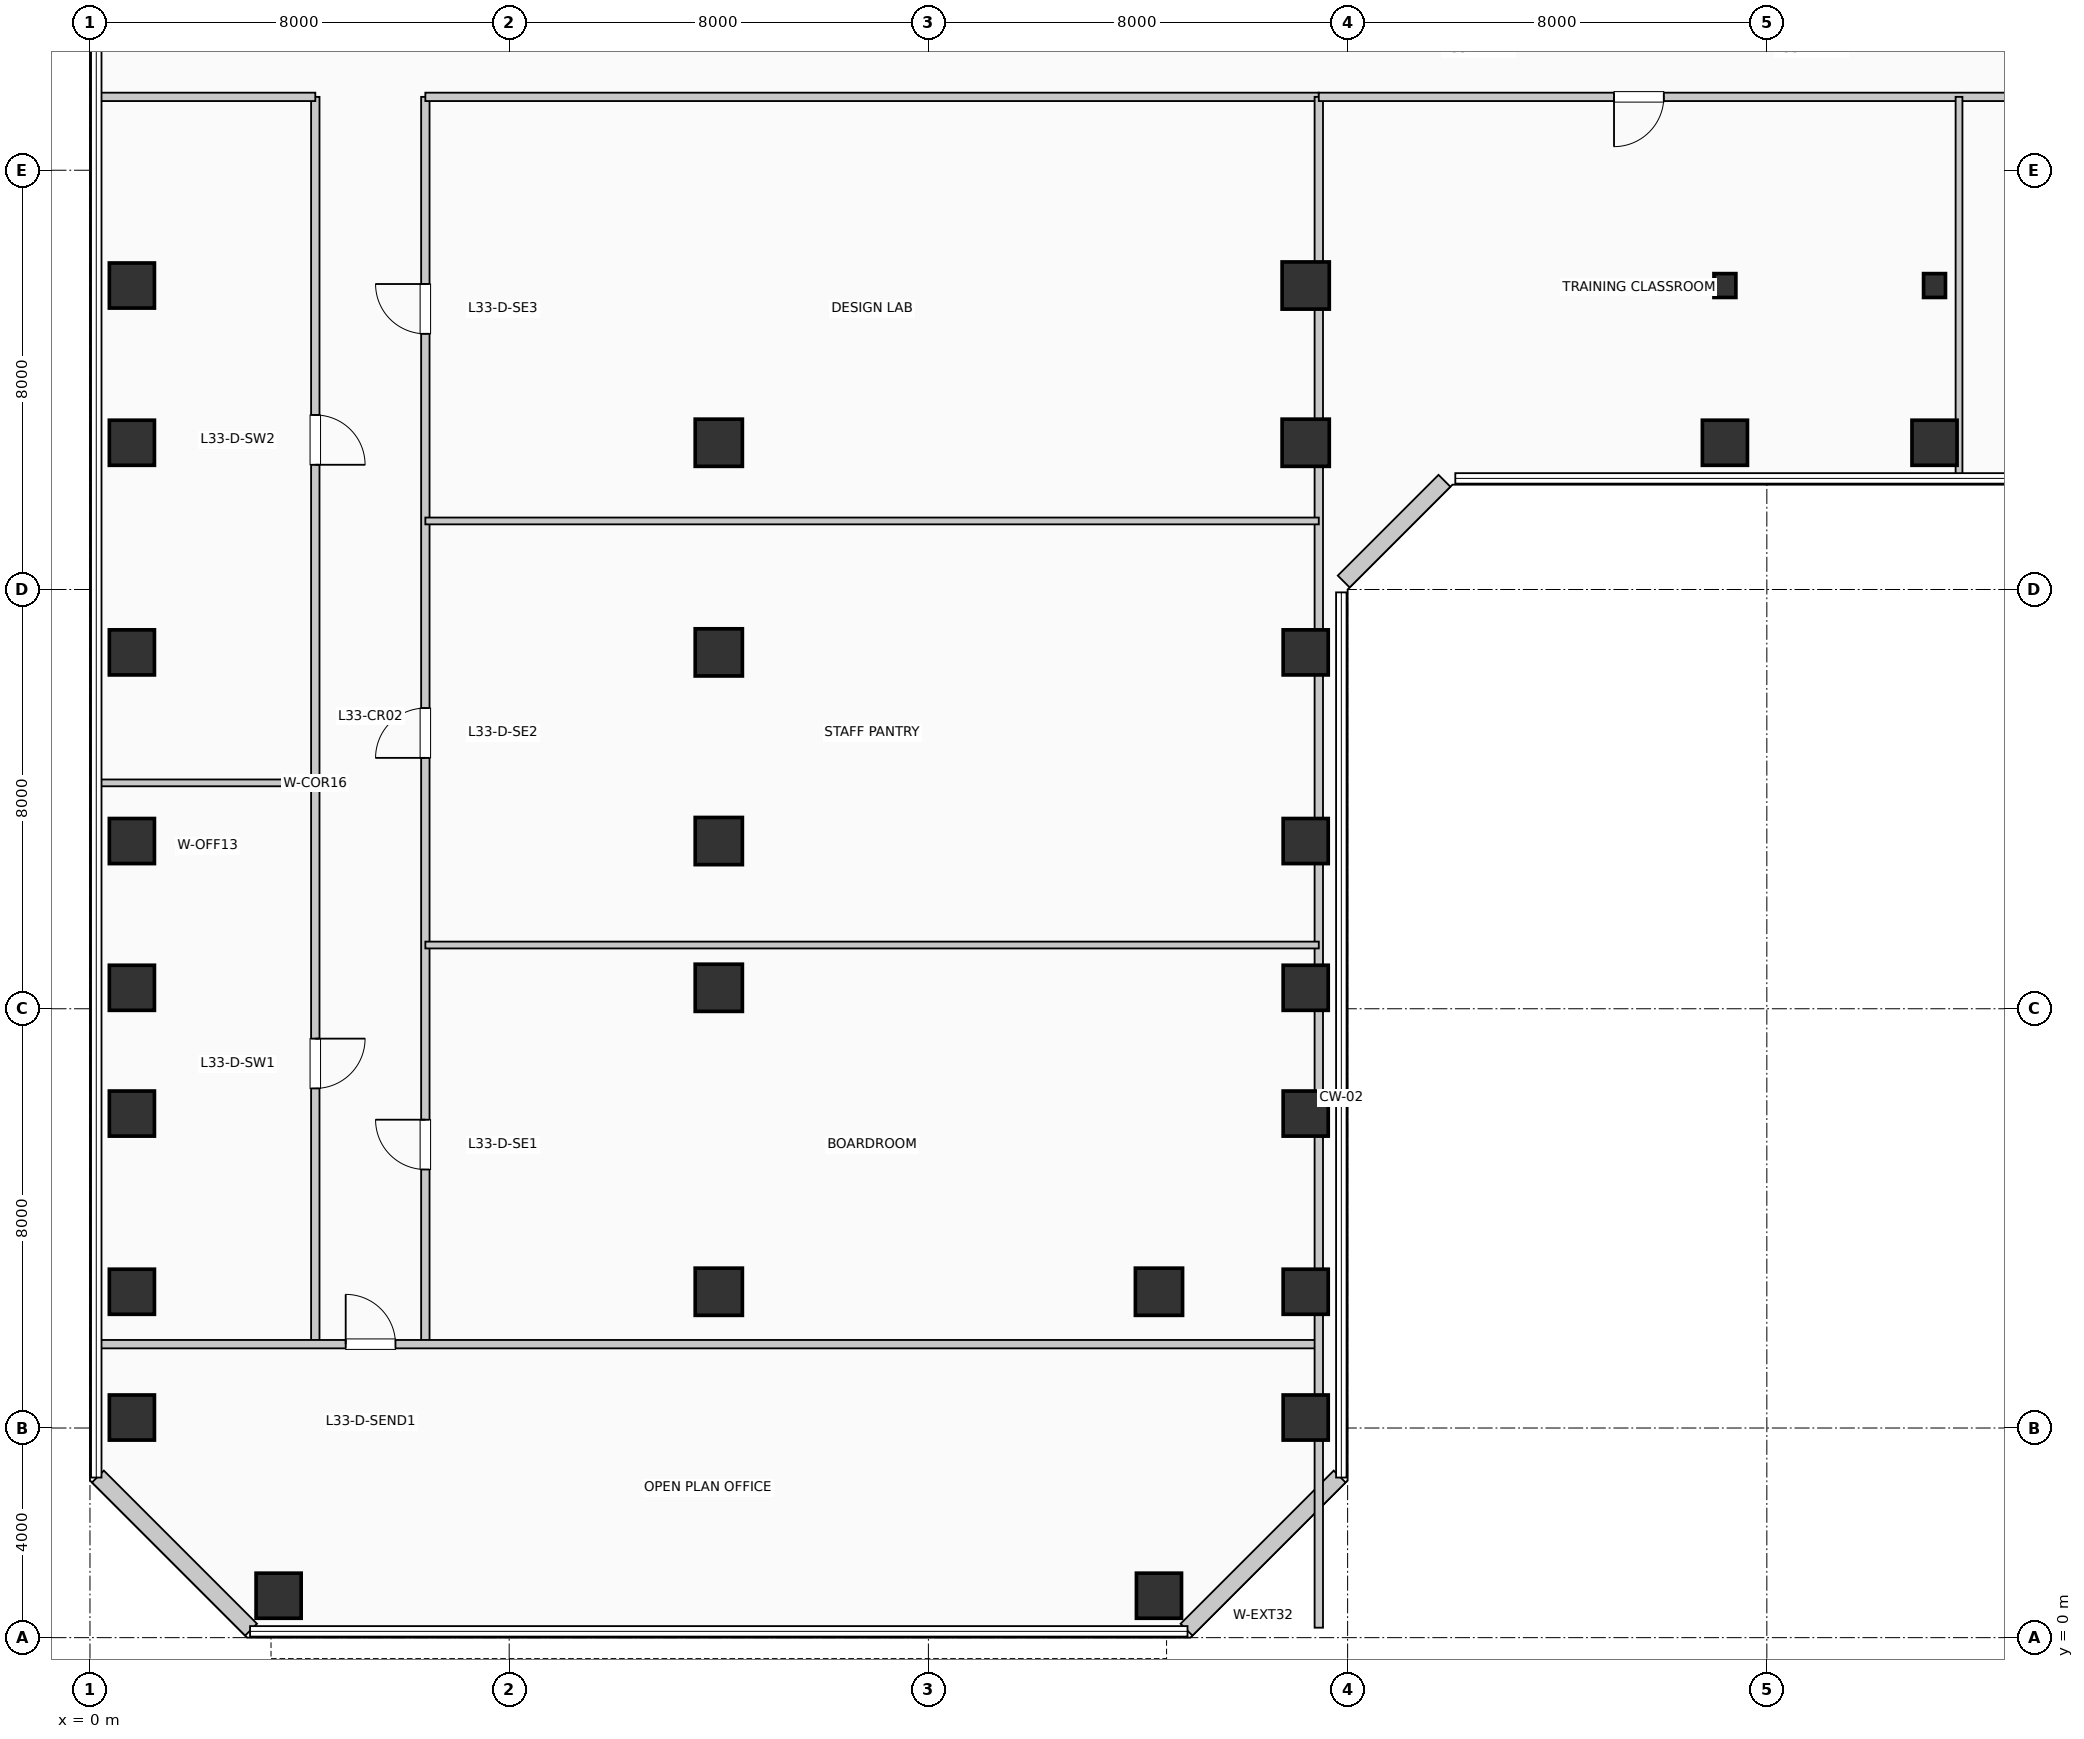
"""IFC4 building model, lengths in metres.
Left out: names, types, materials, properties, quantities, classifications, styles, units other than length and angle.
Written with IfcOpenShell. Run it as: python <this file> out.ifc"""

import sys

from ifc_helpers import new_model, si_unit, direction, frame, frame_2d, origin, origin_2d, place, context, subcontext, project, spatial, rectangle, i_section, extrude, element, fill, save


model = new_model("IFC4")
c1 = context("Model", 3, precision=1e-05, world=origin(), true_north=direction((0.0, 1.0)))
c2 = subcontext(c1, "Body", "Model", "MODEL_VIEW")
j1 = project(units=[si_unit("LENGTHUNIT", "METRE"), si_unit("PLANEANGLEUNIT", "RADIAN")], contexts=[c1])
p1 = place(None, origin())
s1 = spatial("IfcSite", under=j1, at=p1, CompositionType="ELEMENT")
p2 = place(p1, origin())
s2 = spatial("IfcBuilding", under=s1, at=p2, CompositionType="ELEMENT")
p3 = place(p2, frame((0.0, 0.0, 138.93)))
s3 = spatial("IfcBuildingStorey", under=s2, at=p3, CompositionType="ELEMENT", Elevation=138.93)
for number, where, z_axis, x_axis in (
    (1, (0.8, 4.2, 0.0), (0.0, 0.0, 1.0), (1.0, 0.0, 0.0)),
    (2, (0.8, 6.6, 0.0), (0.0, 0.0, 1.0), (1.0, 0.0, 0.0)),
    (3, (0.8, 10.0, 0.0), (0.0, 0.0, 1.0), (1.0, 0.0, 0.0)),
    (4, (0.8, 12.4, 0.0), (0.0, 0.0, 1.0), (1.0, 0.0, 0.0)),
    (5, (0.8, 15.2, 0.0), (0.0, 0.0, 1.0), (1.0, 0.0, 0.0)),
    (6, (0.8, 18.8, 0.0), (0.0, 0.0, 1.0), (1.0, 0.0, 0.0)),
    (7, (0.8, 22.8, 0.0), (0.0, 0.0, 1.0), (1.0, 0.0, 0.0)),
    (8, (0.8, 25.8, 0.0), (0.0, 0.0, 1.0), (1.0, 0.0, 0.0)),
    (9, (3.6, 0.8, 0.0), (0.0, 0.0, 1.0), (1.0, 0.0, 0.0)),
):
    element("IfcColumn", number, at=place(p3, frame(where, z_axis=z_axis, x_axis=x_axis)), inside=s3, PredefinedType="COLUMN", context=c2, shape_type="SweptSolid", body=[
        extrude(rectangle(XDim=0.86, YDim=0.86, at=origin_2d()), origin(), (0.0, 0.0, 1.0), 3.96),
    ])
for number, where, z_axis, x_axis in (
    (10, (12.0, 6.6, 0.0), (0.0, 0.0, 1.0), (1.0, 0.0, 0.0)),
    (11, (12.0, 12.4, 0.0), (0.0, 0.0, 1.0), (1.0, 0.0, 0.0)),
    (12, (12.0, 15.2, 0.0), (0.0, 0.0, 1.0), (1.0, 0.0, 0.0)),
    (13, (12.0, 18.8, 0.0), (0.0, 0.0, 1.0), (1.0, 0.0, 0.0)),
    (14, (12.0, 22.8, 0.0), (0.0, 0.0, 1.0), (1.0, 0.0, 0.0)),
):
    element("IfcColumn", number, at=place(p3, frame(where, z_axis=z_axis, x_axis=x_axis)), inside=s3, PredefinedType="COLUMN", context=c2, shape_type="SweptSolid", body=[
        extrude(rectangle(XDim=0.9, YDim=0.9, at=origin_2d()), origin(), (0.0, 0.0, 1.0), 3.96),
    ])
p4 = place(p3, frame((20.4, 0.8, 0.0), z_axis=(0.0, 0.0, 1.0), x_axis=(1.0, 0.0, 0.0)))
e15 = element("IfcColumn", 15, at=p4, inside=s3, PredefinedType="COLUMN", context=c2, shape_type="SweptSolid", body=[
    extrude(rectangle(XDim=0.86, YDim=0.86, at=origin_2d()), origin(), (0.0, 0.0, 1.0), 3.96),
])
p5 = place(p3, frame((20.4, 6.6, 0.0), z_axis=(0.0, 0.0, 1.0), x_axis=(1.0, 0.0, 0.0)))
e16 = element("IfcColumn", 16, at=p5, inside=s3, PredefinedType="COLUMN", context=c2, shape_type="SweptSolid", body=[
    extrude(rectangle(XDim=0.9, YDim=0.9, at=origin_2d()), origin(), (0.0, 0.0, 1.0), 3.96),
])
for number, where, z_axis, x_axis in (
    (17, (23.2, 4.2, 0.0), (0.0, 0.0, 1.0), (1.0, 0.0, 0.0)),
    (18, (23.2, 6.6, 0.0), (0.0, 0.0, 1.0), (1.0, 0.0, 0.0)),
    (19, (23.2, 10.0, 0.0), (0.0, 0.0, 1.0), (1.0, 0.0, 0.0)),
    (20, (23.2, 12.4, 0.0), (0.0, 0.0, 1.0), (1.0, 0.0, 0.0)),
    (21, (23.2, 15.2, 0.0), (0.0, 0.0, 1.0), (1.0, 0.0, 0.0)),
    (22, (23.2, 18.8, 0.0), (0.0, 0.0, 1.0), (1.0, 0.0, 0.0)),
):
    element("IfcColumn", number, at=place(p3, frame(where, z_axis=z_axis, x_axis=x_axis)), inside=s3, PredefinedType="COLUMN", context=c2, shape_type="SweptSolid", body=[
        extrude(rectangle(XDim=0.86, YDim=0.86, at=origin_2d()), origin(), (0.0, 0.0, 1.0), 3.96),
    ])
for number, where, z_axis, x_axis in (
    (23, (23.2, 22.8, 0.0), (0.0, 0.0, 1.0), (1.0, 0.0, 0.0)),
    (24, (23.2, 25.8, 0.0), (0.0, 0.0, 1.0), (1.0, 0.0, 0.0)),
):
    element("IfcColumn", number, at=place(p3, frame(where, z_axis=z_axis, x_axis=x_axis)), inside=s3, PredefinedType="COLUMN", context=c2, shape_type="SweptSolid", body=[
        extrude(rectangle(XDim=0.9, YDim=0.9, at=origin_2d()), origin(), (0.0, 0.0, 1.0), 3.96),
    ])
p6 = place(p3, frame((31.2, 22.8, 0.0), z_axis=(0.0, 0.0, 1.0), x_axis=(1.0, 0.0, 0.0)))
e25 = element("IfcColumn", 25, at=p6, inside=s3, PredefinedType="COLUMN", context=c2, shape_type="SweptSolid", body=[
    extrude(rectangle(XDim=0.86, YDim=0.86, at=origin_2d()), origin(), (0.0, 0.0, 1.0), 3.96),
])
p7 = place(p3, frame((31.2, 25.8, 0.0), z_axis=(0.0, 0.0, 1.0), x_axis=(1.0, 0.0, 0.0)))
e26 = element("IfcColumn", 26, at=p7, inside=s3, PredefinedType="COLUMN", context=c2, shape_type="SweptSolid", body=[
    extrude(i_section(OverallWidth=0.418, OverallDepth=0.455, WebThickness=0.032, FlangeThickness=0.051, at=origin_2d()), origin(), (0.0, 0.0, 1.0), 3.96),
])
p8 = place(p3, frame((35.2, 22.8, 0.0), z_axis=(0.0, 0.0, 1.0), x_axis=(1.0, 0.0, 0.0)))
e27 = element("IfcColumn", 27, at=p8, inside=s3, PredefinedType="COLUMN", context=c2, shape_type="SweptSolid", body=[
    extrude(rectangle(XDim=0.86, YDim=0.86, at=origin_2d()), origin(), (0.0, 0.0, 1.0), 3.96),
])
p9 = place(p3, frame((35.2, 25.8, 0.0), z_axis=(0.0, 0.0, 1.0), x_axis=(1.0, 0.0, 0.0)))
e28 = element("IfcColumn", 28, at=p9, inside=s3, PredefinedType="COLUMN", context=c2, shape_type="SweptSolid", body=[
    extrude(i_section(OverallWidth=0.418, OverallDepth=0.455, WebThickness=0.032, FlangeThickness=0.051, at=origin_2d()), origin(), (0.0, 0.0, 1.0), 3.96),
])
p10 = place(p3, frame((20.926, 0.152, 0.0), z_axis=(0.0, 0.0, 1.0), x_axis=(0.707106781187, 0.707106781187, 0.0)))
e29 = element("IfcWall", 29, at=p10, inside=s3, PredefinedType="SOLIDWALL", context=c2, shape_type="SweptSolid", body=[
    extrude(rectangle(XDim=4.133, YDim=0.32, at=frame_2d((2.066, 0.0))), origin(), (0.0, 0.0, 1.0), 3.71),
])
p11 = place(p3, frame((23.926, 20.152, 0.0), z_axis=(0.0, 0.0, 1.0), x_axis=(0.707106781187, 0.707106781187, 0.0)))
e30 = element("IfcWall", 30, at=p11, inside=s3, PredefinedType="SOLIDWALL", context=c2, shape_type="SweptSolid", body=[
    extrude(rectangle(XDim=2.718, YDim=0.32, at=frame_2d((1.359, 0.0))), origin(), (0.0, 0.0, 1.0), 3.71),
])
p12 = place(p3, frame((0.152, 3.074, 0.0), z_axis=(0.0, 0.0, 1.0), x_axis=(0.707106781187, -0.707106781187, 0.0)))
e31 = element("IfcWall", 31, at=p12, inside=s3, PredefinedType="SOLIDWALL", context=c2, shape_type="SweptSolid", body=[
    extrude(rectangle(XDim=4.133, YDim=0.32, at=frame_2d((2.066, 0.0))), origin(), (0.0, 0.0, 1.0), 3.71),
])
p13 = place(p3, frame((4.3, 5.6, 0.0), z_axis=(0.0, 0.0, 1.0), x_axis=(0.0, 1.0, 0.0)))
e32 = element("IfcWall", 32, at=p13, inside=s3, PredefinedType="PARTITIONING", context=c2, shape_type="SweptSolid", body=[
    extrude(rectangle(XDim=23.8, YDim=0.16, at=frame_2d((11.9, 0.0))), origin(), (0.0, 0.0, 1.0), 3.71),
])
p14 = place(p13, frame((5.83, 0.0, 0.0), z_axis=(0.0, 0.0, 1.0), x_axis=(-1.0, 0.0, 0.0)))
e33 = element("IfcOpeningElement", 33, at=p14, cuts=e32, PredefinedType="OPENING", context=c2, shape_type="SweptSolid", body=[
    extrude(rectangle(XDim=0.95, YDim=2.15, at=frame_2d((0.475, 1.075))), frame((0.0, 0.09, 0.0), z_axis=(0.0, -1.0, 0.0), x_axis=(1.0, 0.0, 0.0)), (0.0, 0.0, 1.0), 0.18),
])
p15 = place(p13, frame((17.73, 0.0, 0.0), z_axis=(0.0, 0.0, 1.0), x_axis=(-1.0, 0.0, 0.0)))
e34 = element("IfcOpeningElement", 34, at=p15, cuts=e32, PredefinedType="OPENING", context=c2, shape_type="SweptSolid", body=[
    extrude(rectangle(XDim=0.95, YDim=2.15, at=frame_2d((0.475, 1.075))), frame((0.0, 0.09, 0.0), z_axis=(0.0, -1.0, 0.0), x_axis=(1.0, 0.0, 0.0)), (0.0, 0.0, 1.0), 0.18),
])
p16 = place(p3, frame((6.4, 5.6, 0.0), z_axis=(0.0, 0.0, 1.0), x_axis=(0.0, 1.0, 0.0)))
e35 = element("IfcWall", 35, at=p16, inside=s3, PredefinedType="PARTITIONING", context=c2, shape_type="SweptSolid", body=[
    extrude(rectangle(XDim=23.8, YDim=0.16, at=frame_2d((11.9, 0.0))), origin(), (0.0, 0.0, 1.0), 3.71),
])
p17 = place(p16, frame((3.333, 0.0, 0.0)))
e36 = element("IfcOpeningElement", 36, at=p17, cuts=e35, PredefinedType="OPENING", context=c2, shape_type="SweptSolid", body=[
    extrude(rectangle(XDim=0.95, YDim=2.15, at=frame_2d((0.475, 1.075))), frame((0.0, 0.09, 0.0), z_axis=(0.0, -1.0, 0.0), x_axis=(1.0, 0.0, 0.0)), (0.0, 0.0, 1.0), 0.18),
])
p18 = place(p16, frame((11.187, 0.0, 0.0)))
e37 = element("IfcOpeningElement", 37, at=p18, cuts=e35, PredefinedType="OPENING", context=c2, shape_type="SweptSolid", body=[
    extrude(rectangle(XDim=0.95, YDim=2.15, at=frame_2d((0.475, 1.075))), frame((0.0, 0.09, 0.0), z_axis=(0.0, -1.0, 0.0), x_axis=(1.0, 0.0, 0.0)), (0.0, 0.0, 1.0), 0.18),
])
p19 = place(p16, frame((19.279, 0.0, 0.0)))
e38 = element("IfcOpeningElement", 38, at=p19, cuts=e35, PredefinedType="OPENING", context=c2, shape_type="SweptSolid", body=[
    extrude(rectangle(XDim=0.95, YDim=2.15, at=frame_2d((0.475, 1.075))), frame((0.0, 0.09, 0.0), z_axis=(0.0, -1.0, 0.0), x_axis=(1.0, 0.0, 0.0)), (0.0, 0.0, 1.0), 0.18),
])
p20 = place(p3, frame((0.19, 5.6, 0.0), z_axis=(0.0, 0.0, 1.0), x_axis=(1.0, 0.0, 0.0)))
e39 = element("IfcWall", 39, at=p20, inside=s3, PredefinedType="PARTITIONING", context=c2, shape_type="SweptSolid", body=[
    extrude(rectangle(XDim=23.26, YDim=0.16, at=frame_2d((11.63, 0.0))), origin(), (0.0, 0.0, 1.0), 3.71),
])
p21 = place(p20, frame((4.69, 0.0, 0.0)))
e40 = element("IfcOpeningElement", 40, at=p21, cuts=e39, PredefinedType="OPENING", context=c2, shape_type="SweptSolid", body=[
    extrude(rectangle(XDim=0.95, YDim=2.15, at=frame_2d((0.475, 1.075))), frame((0.0, 0.09, 0.0), z_axis=(0.0, -1.0, 0.0), x_axis=(1.0, 0.0, 0.0)), (0.0, 0.0, 1.0), 0.18),
])
p22 = place(p3, frame((0.19, 29.4, 0.0), z_axis=(0.0, 0.0, 1.0), x_axis=(1.0, 0.0, 0.0)))
e41 = element("IfcWall", 41, at=p22, inside=s3, PredefinedType="PARTITIONING", context=c2, shape_type="SweptSolid", body=[
    extrude(rectangle(XDim=4.11, YDim=0.16, at=frame_2d((2.055, 0.0))), origin(), (0.0, 0.0, 1.0), 3.365),
])
p23 = place(p3, frame((6.4, 29.4, 0.0), z_axis=(0.0, 0.0, 1.0), x_axis=(1.0, 0.0, 0.0)))
e42 = element("IfcWall", 42, at=p23, inside=s3, PredefinedType="PARTITIONING", context=c2, shape_type="SweptSolid", body=[
    extrude(rectangle(XDim=17.05, YDim=0.16, at=frame_2d((8.525, 0.0))), origin(), (0.0, 0.0, 1.0), 3.365),
])
p24 = place(p3, frame((23.45, 0.19, 0.0), z_axis=(0.0, 0.0, 1.0), x_axis=(0.0, 1.0, 0.0)))
e43 = element("IfcWall", 43, at=p24, inside=s3, PredefinedType="PARTITIONING", context=c2, shape_type="SweptSolid", body=[
    extrude(rectangle(XDim=29.21, YDim=0.16, at=frame_2d((14.605, 0.0))), origin(), (0.0, 0.0, 1.0), 3.045),
])
p25 = place(p3, frame((0.19, 16.31, 0.0), z_axis=(0.0, 0.0, 1.0), x_axis=(1.0, 0.0, 0.0)))
e44 = element("IfcWall", 44, at=p25, inside=s3, PredefinedType="PARTITIONING", context=c2, shape_type="SweptSolid", body=[
    extrude(rectangle(XDim=4.11, YDim=0.13, at=frame_2d((2.055, 0.0))), origin(), (0.0, 0.0, 1.0), 3.71),
])
for number, where, z_axis, x_axis in (
    (45, (6.4, 13.216, 0.0), (0.0, 0.0, 1.0), (1.0, 0.0, 0.0)),
    (46, (6.4, 21.308, 0.0), (0.0, 0.0, 1.0), (1.0, 0.0, 0.0)),
):
    element("IfcWall", number, at=place(p3, frame(where, z_axis=z_axis, x_axis=x_axis)), inside=s3, PredefinedType="PARTITIONING", context=c2, shape_type="SweptSolid", body=[
        extrude(rectangle(XDim=17.05, YDim=0.13, at=frame_2d((8.525, 0.0))), origin(), (0.0, 0.0, 1.0), 3.71),
    ])
p26 = place(p3, frame((23.45, 29.4, 0.0), z_axis=(0.0, 0.0, 1.0), x_axis=(1.0, 0.0, 0.0)))
e47 = element("IfcWall", 47, at=p26, inside=s3, PredefinedType="PARTITIONING", context=c2, shape_type="SweptSolid", body=[
    extrude(rectangle(XDim=26.56, YDim=0.16, at=frame_2d((13.28, 0.0))), origin(), (0.0, 0.0, 1.0), 3.365),
])
p27 = place(p26, frame((6.584, 0.0, 0.0), z_axis=(0.0, 0.0, 1.0), x_axis=(-1.0, 0.0, 0.0)))
e48 = element("IfcOpeningElement", 48, at=p27, cuts=e47, PredefinedType="OPENING", context=c2, shape_type="SweptSolid", body=[
    extrude(rectangle(XDim=0.95, YDim=2.15, at=frame_2d((0.475, 1.075))), frame((0.0, 0.09, 0.0), z_axis=(0.0, -1.0, 0.0), x_axis=(1.0, 0.0, 0.0)), (0.0, 0.0, 1.0), 0.18),
])
p28 = place(p26, frame((19.864, 0.0, 0.0), z_axis=(0.0, 0.0, 1.0), x_axis=(-1.0, 0.0, 0.0)))
e49 = element("IfcOpeningElement", 49, at=p28, cuts=e47, PredefinedType="OPENING", context=c2, shape_type="SweptSolid", body=[
    extrude(rectangle(XDim=0.95, YDim=2.15, at=frame_2d((0.475, 1.075))), frame((0.0, 0.09, 0.0), z_axis=(0.0, -1.0, 0.0), x_axis=(1.0, 0.0, 0.0)), (0.0, 0.0, 1.0), 0.18),
])
p29 = place(p3, frame((35.667, 22.19, 0.0), z_axis=(0.0, 0.0, 1.0), x_axis=(0.0, 1.0, 0.0)))
e50 = element("IfcWall", 50, at=p29, inside=s3, PredefinedType="PARTITIONING", context=c2, shape_type="SweptSolid", body=[
    extrude(rectangle(XDim=7.21, YDim=0.13, at=frame_2d((3.605, 0.0))), origin(), (0.0, 0.0, 1.0), 3.045),
])
p30 = place(p21, origin())
e51 = element("IfcDoor", 51, at=p30, inside=s3, OperationType="SINGLE_SWING_LEFT", PredefinedType="DOOR", context=c2, shape_type="SweptSolid", body=[
    extrude(rectangle(XDim=0.95, YDim=2.15, at=frame_2d((0.475, 1.075))), frame((0.0, 0.025, 0.0), z_axis=(0.0, -1.0, 0.0), x_axis=(1.0, 0.0, 0.0)), (0.0, 0.0, 1.0), 0.05),
])
fill(e40, e51)
p31 = place(p14, origin())
e52 = element("IfcDoor", 52, at=p31, inside=s3, OperationType="SINGLE_SWING_RIGHT", PredefinedType="DOOR", context=c2, shape_type="SweptSolid", body=[
    extrude(rectangle(XDim=0.95, YDim=2.15, at=frame_2d((0.475, 1.075))), frame((0.0, 0.025, 0.0), z_axis=(0.0, -1.0, 0.0), x_axis=(1.0, 0.0, 0.0)), (0.0, 0.0, 1.0), 0.05),
])
fill(e33, e52)
p32 = place(p15, origin())
e53 = element("IfcDoor", 53, at=p32, inside=s3, OperationType="SINGLE_SWING_LEFT", PredefinedType="DOOR", context=c2, shape_type="SweptSolid", body=[
    extrude(rectangle(XDim=0.95, YDim=2.15, at=frame_2d((0.475, 1.075))), frame((0.0, 0.025, 0.0), z_axis=(0.0, -1.0, 0.0), x_axis=(1.0, 0.0, 0.0)), (0.0, 0.0, 1.0), 0.05),
])
fill(e34, e53)
p33 = place(p17, origin())
e54 = element("IfcDoor", 54, at=p33, inside=s3, OperationType="SINGLE_SWING_RIGHT", PredefinedType="DOOR", context=c2, shape_type="SweptSolid", body=[
    extrude(rectangle(XDim=0.95, YDim=2.15, at=frame_2d((0.475, 1.075))), frame((0.0, 0.025, 0.0), z_axis=(0.0, -1.0, 0.0), x_axis=(1.0, 0.0, 0.0)), (0.0, 0.0, 1.0), 0.05),
])
fill(e36, e54)
p34 = place(p18, origin())
e55 = element("IfcDoor", 55, at=p34, inside=s3, OperationType="SINGLE_SWING_LEFT", PredefinedType="DOOR", context=c2, shape_type="SweptSolid", body=[
    extrude(rectangle(XDim=0.95, YDim=2.15, at=frame_2d((0.475, 1.075))), frame((0.0, 0.025, 0.0), z_axis=(0.0, -1.0, 0.0), x_axis=(1.0, 0.0, 0.0)), (0.0, 0.0, 1.0), 0.05),
])
fill(e37, e55)
p35 = place(p19, origin())
e56 = element("IfcDoor", 56, at=p35, inside=s3, OperationType="SINGLE_SWING_RIGHT", PredefinedType="DOOR", context=c2, shape_type="SweptSolid", body=[
    extrude(rectangle(XDim=0.95, YDim=2.15, at=frame_2d((0.475, 1.075))), frame((0.0, 0.025, 0.0), z_axis=(0.0, -1.0, 0.0), x_axis=(1.0, 0.0, 0.0)), (0.0, 0.0, 1.0), 0.05),
])
fill(e38, e56)
p36 = place(p27, origin())
e57 = element("IfcDoor", 57, at=p36, inside=s3, OperationType="SINGLE_SWING_LEFT", PredefinedType="DOOR", context=c2, shape_type="SweptSolid", body=[
    extrude(rectangle(XDim=0.95, YDim=2.15, at=frame_2d((0.475, 1.075))), frame((0.0, 0.025, 0.0), z_axis=(0.0, -1.0, 0.0), x_axis=(1.0, 0.0, 0.0)), (0.0, 0.0, 1.0), 0.05),
])
fill(e48, e57)
save(model, sys.argv[1])
